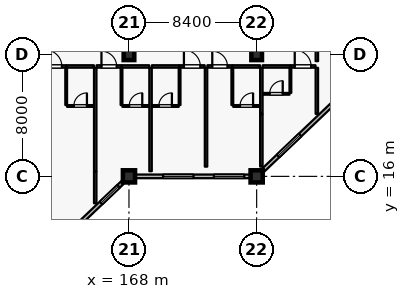
"""IFC4 building model, lengths in metres.
Left out: names, types, materials, properties, quantities, classifications, styles, units other than length and angle.
Written with IfcOpenShell. Run it as: python <this file> out.ifc"""

import sys

from ifc_helpers import new_model, si_unit, direction, frame, frame_2d, origin, origin_2d, place, context, subcontext, project, spatial, rectangle, extrude, element, fill, save


model = new_model("IFC4")
c1 = context("Model", 3, precision=1e-05, world=origin(), true_north=direction((0.0, 1.0)))
c2 = subcontext(c1, "Body", "Model", "MODEL_VIEW")
j1 = project(units=[si_unit("LENGTHUNIT", "METRE"), si_unit("PLANEANGLEUNIT", "RADIAN")], contexts=[c1])
p1 = place(None, origin())
s1 = spatial("IfcSite", under=j1, at=p1, CompositionType="ELEMENT")
p2 = place(p1, origin())
s2 = spatial("IfcBuilding", under=s1, at=p2, CompositionType="ELEMENT")
p3 = place(p2, frame((0.0, 0.0, 11.4)))
s3 = spatial("IfcBuildingStorey", under=s2, at=p3, CompositionType="ELEMENT", Elevation=11.4)
for number, where, z_axis, x_axis in (
    (1, (168.0, 16.0, 0.0), (0.0, 0.0, 1.0), (1.0, 0.0, 0.0)),
    (2, (176.4, 16.0, 0.0), (0.0, 0.0, 1.0), (1.0, 0.0, 0.0)),
):
    element("IfcColumn", number, at=place(p3, frame(where, z_axis=z_axis, x_axis=x_axis)), inside=s3, PredefinedType="COLUMN", context=c2, shape_type="SweptSolid", body=[
        extrude(rectangle(XDim=0.8, YDim=0.8, at=origin_2d()), origin(), (0.0, 0.0, 1.0), 4.8),
    ])
for number, where, z_axis, x_axis in (
    (3, (168.0, 24.0, 0.0), (0.0, 0.0, 1.0), (1.0, 0.0, 0.0)),
    (4, (176.4, 24.0, 0.0), (0.0, 0.0, 1.0), (1.0, 0.0, 0.0)),
):
    element("IfcColumn", number, at=place(p3, frame(where, z_axis=z_axis, x_axis=x_axis)), inside=s3, PredefinedType="COLUMN", context=c2, shape_type="SweptSolid", body=[
        extrude(rectangle(XDim=0.7, YDim=0.7, at=origin_2d()), origin(), (0.0, 0.0, 1.0), 4.8),
    ])
p4 = place(p3, frame((167.6, 15.619, 0.0), z_axis=(0.0, 0.0, 1.0), x_axis=(-0.724156739794, -0.689635422677, 0.0)))
e5 = element("IfcWall", 5, at=p4, inside=s3, PredefinedType="SOLIDWALL", context=c2, shape_type="SweptSolid", body=[
    extrude(rectangle(XDim=10.495, YDim=0.24, at=frame_2d((5.248, 0.0))), origin(), (0.0, 0.0, 1.0), 4.13),
])
p5 = place(p4, frame((0.388, 0.0, 0.8)))
e6 = element("IfcOpeningElement", 6, at=p5, cuts=e5, PredefinedType="OPENING", context=c2, shape_type="SweptSolid", body=[
    extrude(rectangle(XDim=1.6, YDim=1.6, at=frame_2d((0.8, 0.8))), frame((0.0, 0.13, 0.0), z_axis=(0.0, -1.0, 0.0), x_axis=(1.0, 0.0, 0.0)), (0.0, 0.0, 1.0), 0.26),
])
p6 = place(p4, frame((4.234, 0.0, 0.8)))
e7 = element("IfcOpeningElement", 7, at=p6, cuts=e5, PredefinedType="OPENING", context=c2, shape_type="SweptSolid", body=[
    extrude(rectangle(XDim=1.6, YDim=1.6, at=frame_2d((0.8, 0.8))), frame((0.0, 0.13, 0.0), z_axis=(0.0, -1.0, 0.0), x_axis=(1.0, 0.0, 0.0)), (0.0, 0.0, 1.0), 0.26),
])
p7 = place(p4, frame((8.294, 0.0, 0.8)))
e8 = element("IfcOpeningElement", 8, at=p7, cuts=e5, PredefinedType="OPENING", context=c2, shape_type="SweptSolid", body=[
    extrude(rectangle(XDim=1.6, YDim=1.6, at=frame_2d((0.8, 0.8))), frame((0.0, 0.13, 0.0), z_axis=(0.0, -1.0, 0.0), x_axis=(1.0, 0.0, 0.0)), (0.0, 0.0, 1.0), 0.26),
])
p8 = place(p3, frame((176.0, 16.0, 0.0), z_axis=(0.0, 0.0, 1.0), x_axis=(-1.0, 0.0, 0.0)))
e9 = element("IfcWall", 9, at=p8, inside=s3, PredefinedType="SOLIDWALL", context=c2, shape_type="SweptSolid", body=[
    extrude(rectangle(XDim=7.6, YDim=0.24, at=frame_2d((3.8, 0.0))), origin(), (0.0, 0.0, 1.0), 4.13),
])
p9 = place(p8, frame((0.415, 0.0, 0.8)))
e10 = element("IfcOpeningElement", 10, at=p9, cuts=e9, PredefinedType="OPENING", context=c2, shape_type="SweptSolid", body=[
    extrude(rectangle(XDim=2.0, YDim=1.75, at=frame_2d((1.0, 0.875))), frame((0.0, 0.13, 0.0), z_axis=(0.0, -1.0, 0.0), x_axis=(1.0, 0.0, 0.0)), (0.0, 0.0, 1.0), 0.26),
])
p10 = place(p8, frame((3.755, 0.0, 0.8)))
e11 = element("IfcOpeningElement", 11, at=p10, cuts=e9, PredefinedType="OPENING", context=c2, shape_type="SweptSolid", body=[
    extrude(rectangle(XDim=2.0, YDim=1.75, at=frame_2d((1.0, 0.875))), frame((0.0, 0.13, 0.0), z_axis=(0.0, -1.0, 0.0), x_axis=(1.0, 0.0, 0.0)), (0.0, 0.0, 1.0), 0.26),
])
p11 = place(p3, frame((184.4, 23.619, 0.0), z_axis=(0.0, 0.0, 1.0), x_axis=(-0.724145676014, -0.689647040094, 0.0)))
e12 = element("IfcWall", 12, at=p11, inside=s3, PredefinedType="SOLIDWALL", context=c2, shape_type="SweptSolid", body=[
    extrude(rectangle(XDim=10.495, YDim=0.24, at=frame_2d((5.248, 0.0))), origin(), (0.0, 0.0, 1.0), 4.13),
])
p12 = place(p11, frame((2.066, 0.0, 0.8)))
e13 = element("IfcOpeningElement", 13, at=p12, cuts=e12, PredefinedType="OPENING", context=c2, shape_type="SweptSolid", body=[
    extrude(rectangle(XDim=2.0, YDim=1.75, at=frame_2d((1.0, 0.875))), frame((0.0, 0.13, 0.0), z_axis=(0.0, -1.0, 0.0), x_axis=(1.0, 0.0, 0.0)), (0.0, 0.0, 1.0), 0.26),
])
p13 = place(p11, frame((7.099, 0.0, 0.8)))
e14 = element("IfcOpeningElement", 14, at=p13, cuts=e12, PredefinedType="OPENING", context=c2, shape_type="SweptSolid", body=[
    extrude(rectangle(XDim=2.0, YDim=1.75, at=frame_2d((1.0, 0.875))), frame((0.0, 0.13, 0.0), z_axis=(0.0, -1.0, 0.0), x_axis=(1.0, 0.0, 0.0)), (0.0, 0.0, 1.0), 0.26),
])
p14 = place(p3, frame((162.22, 23.23, 0.0), z_axis=(0.0, 0.0, 1.0), x_axis=(1.0, 0.0, 0.0)))
e15 = element("IfcWall", 15, at=p14, inside=s3, PredefinedType="PARTITIONING", context=c2, shape_type="SweptSolid", body=[
    extrude(rectangle(XDim=1.65, YDim=0.16, at=frame_2d((0.825, 0.0))), origin(), (0.0, 0.0, 1.0), 4.535),
])
p15 = place(p14, frame((0.285, 0.0, 0.0)))
e16 = element("IfcOpeningElement", 16, at=p15, cuts=e15, PredefinedType="OPENING", context=c2, shape_type="SweptSolid", body=[
    extrude(rectangle(XDim=1.08, YDim=2.3, at=frame_2d((0.54, 1.15))), frame((0.0, 0.09, 0.0), z_axis=(0.0, -1.0, 0.0), x_axis=(1.0, 0.0, 0.0)), (0.0, 0.0, 1.0), 0.18),
])
p16 = place(p3, frame((163.88, 23.23, 0.0), z_axis=(0.0, 0.0, 1.0), x_axis=(1.0, 0.0, 0.0)))
e17 = element("IfcWall", 17, at=p16, inside=s3, PredefinedType="PARTITIONING", context=c2, shape_type="SweptSolid", body=[
    extrude(rectangle(XDim=1.81, YDim=0.16, at=frame_2d((0.905, 0.0))), origin(), (0.0, 0.0, 1.0), 4.535),
])
p17 = place(p3, frame((163.87, 20.69, 0.0), z_axis=(0.0, 0.0, 1.0), x_axis=(0.0, 1.0, 0.0)))
e18 = element("IfcWall", 18, at=p17, inside=s3, PredefinedType="PARTITIONING", context=c2, shape_type="SweptSolid", body=[
    extrude(rectangle(XDim=2.45, YDim=0.115, at=frame_2d((1.225, 0.0))), origin(), (0.0, 0.0, 1.0), 4.535),
])
p18 = place(p3, frame((163.93, 20.63, 0.0), z_axis=(0.0, 0.0, 1.0), x_axis=(1.0, 0.0, 0.0)))
e19 = element("IfcWall", 19, at=p18, inside=s3, PredefinedType="PARTITIONING", context=c2, shape_type="SweptSolid", body=[
    extrude(rectangle(XDim=1.75, YDim=0.115, at=frame_2d((0.875, 0.0))), origin(), (0.0, 0.0, 1.0), 4.535),
])
p19 = place(p18, frame((0.445, 0.0, 0.0)))
e20 = element("IfcOpeningElement", 20, at=p19, cuts=e19, PredefinedType="OPENING", context=c2, shape_type="SweptSolid", body=[
    extrude(rectangle(XDim=0.86, YDim=2.12, at=frame_2d((0.43, 1.06))), frame((0.0, 0.067, 0.0), z_axis=(0.0, -1.0, 0.0), x_axis=(1.0, 0.0, 0.0)), (0.0, 0.0, 1.0), 0.135),
])
p20 = place(p3, frame((165.78, 14.23, 0.0), z_axis=(0.0, 0.0, 1.0), x_axis=(0.0, 1.0, 0.0)))
e21 = element("IfcWall", 21, at=p20, inside=s3, PredefinedType="PARTITIONING", context=c2, shape_type="SweptSolid", body=[
    extrude(rectangle(XDim=2.1, YDim=0.16, at=frame_2d((1.05, 0.0))), origin(), (0.0, 0.0, 1.0), 4.535),
])
p21 = place(p3, frame((165.87, 23.23, 0.0), z_axis=(0.0, 0.0, 1.0), x_axis=(1.0, 0.0, 0.0)))
e22 = element("IfcWall", 22, at=p21, inside=s3, PredefinedType="PARTITIONING", context=c2, shape_type="SweptSolid", body=[
    extrude(rectangle(XDim=1.64, YDim=0.16, at=frame_2d((0.82, 0.0))), origin(), (0.0, 0.0, 1.0), 4.535),
])
p22 = place(p21, frame((0.32, 0.0, 0.0)))
e23 = element("IfcOpeningElement", 23, at=p22, cuts=e22, PredefinedType="OPENING", context=c2, shape_type="SweptSolid", body=[
    extrude(rectangle(XDim=1.0, YDim=2.25, at=frame_2d((0.5, 1.125))), frame((0.0, 0.09, 0.0), z_axis=(0.0, -1.0, 0.0), x_axis=(1.0, 0.0, 0.0)), (0.0, 0.0, 1.0), 0.18),
])
p23 = place(p3, frame((167.52, 23.23, 0.0), z_axis=(0.0, 0.0, 1.0), x_axis=(1.0, 0.0, 0.0)))
e24 = element("IfcWall", 24, at=p23, inside=s3, PredefinedType="PARTITIONING", context=c2, shape_type="SweptSolid", body=[
    extrude(rectangle(XDim=1.81, YDim=0.16, at=frame_2d((0.905, 0.0))), origin(), (0.0, 0.0, 1.0), 4.535),
])
p24 = place(p3, frame((167.51, 20.69, 0.0), z_axis=(0.0, 0.0, 1.0), x_axis=(0.0, 1.0, 0.0)))
e25 = element("IfcWall", 25, at=p24, inside=s3, PredefinedType="PARTITIONING", context=c2, shape_type="SweptSolid", body=[
    extrude(rectangle(XDim=2.45, YDim=0.115, at=frame_2d((1.225, 0.0))), origin(), (0.0, 0.0, 1.0), 4.535),
])
p25 = place(p3, frame((167.57, 20.63, 0.0), z_axis=(0.0, 0.0, 1.0), x_axis=(1.0, 0.0, 0.0)))
e26 = element("IfcWall", 26, at=p25, inside=s3, PredefinedType="PARTITIONING", context=c2, shape_type="SweptSolid", body=[
    extrude(rectangle(XDim=1.75, YDim=0.115, at=frame_2d((0.875, 0.0))), origin(), (0.0, 0.0, 1.0), 4.535),
])
p26 = place(p25, frame((0.445, 0.0, 0.0)))
e27 = element("IfcOpeningElement", 27, at=p26, cuts=e26, PredefinedType="OPENING", context=c2, shape_type="SweptSolid", body=[
    extrude(rectangle(XDim=0.86, YDim=2.12, at=frame_2d((0.43, 1.06))), frame((0.0, 0.067, 0.0), z_axis=(0.0, -1.0, 0.0), x_axis=(1.0, 0.0, 0.0)), (0.0, 0.0, 1.0), 0.135),
])
p27 = place(p3, frame((165.78, 16.34, 0.0), z_axis=(0.0, 0.0, 1.0), x_axis=(0.0, 1.0, 0.0)))
e28 = element("IfcWall", 28, at=p27, inside=s3, PredefinedType="PARTITIONING", context=c2, shape_type="SweptSolid", body=[
    extrude(rectangle(XDim=6.8, YDim=0.16, at=frame_2d((3.4, 0.0))), origin(), (0.0, 0.0, 1.0), 4.535),
])
p28 = place(p3, frame((169.51, 23.23, 0.0), z_axis=(0.0, 0.0, 1.0), x_axis=(1.0, 0.0, 0.0)))
e29 = element("IfcWall", 29, at=p28, inside=s3, PredefinedType="PARTITIONING", context=c2, shape_type="SweptSolid", body=[
    extrude(rectangle(XDim=1.81, YDim=0.16, at=frame_2d((0.905, 0.0))), origin(), (0.0, 0.0, 1.0), 4.535),
])
p29 = place(p3, frame((171.33, 23.23, 0.0), z_axis=(0.0, 0.0, 1.0), x_axis=(1.0, 0.0, 0.0)))
e30 = element("IfcWall", 30, at=p29, inside=s3, PredefinedType="PARTITIONING", context=c2, shape_type="SweptSolid", body=[
    extrude(rectangle(XDim=1.65, YDim=0.16, at=frame_2d((0.825, 0.0))), origin(), (0.0, 0.0, 1.0), 4.535),
])
p30 = place(p29, frame((0.285, 0.0, 0.0)))
e31 = element("IfcOpeningElement", 31, at=p30, cuts=e30, PredefinedType="OPENING", context=c2, shape_type="SweptSolid", body=[
    extrude(rectangle(XDim=1.08, YDim=2.3, at=frame_2d((0.54, 1.15))), frame((0.0, 0.09, 0.0), z_axis=(0.0, -1.0, 0.0), x_axis=(1.0, 0.0, 0.0)), (0.0, 0.0, 1.0), 0.18),
])
p31 = place(p3, frame((171.33, 20.69, 0.0), z_axis=(0.0, 0.0, 1.0), x_axis=(0.0, 1.0, 0.0)))
e32 = element("IfcWall", 32, at=p31, inside=s3, PredefinedType="PARTITIONING", context=c2, shape_type="SweptSolid", body=[
    extrude(rectangle(XDim=2.45, YDim=0.115, at=frame_2d((1.225, 0.0))), origin(), (0.0, 0.0, 1.0), 4.535),
])
p32 = place(p3, frame((169.52, 20.63, 0.0), z_axis=(0.0, 0.0, 1.0), x_axis=(1.0, 0.0, 0.0)))
e33 = element("IfcWall", 33, at=p32, inside=s3, PredefinedType="PARTITIONING", context=c2, shape_type="SweptSolid", body=[
    extrude(rectangle(XDim=1.75, YDim=0.115, at=frame_2d((0.875, 0.0))), origin(), (0.0, 0.0, 1.0), 4.535),
])
p33 = place(p32, frame((0.445, 0.0, 0.0)))
e34 = element("IfcOpeningElement", 34, at=p33, cuts=e33, PredefinedType="OPENING", context=c2, shape_type="SweptSolid", body=[
    extrude(rectangle(XDim=0.86, YDim=2.12, at=frame_2d((0.43, 1.06))), frame((0.0, 0.067, 0.0), z_axis=(0.0, -1.0, 0.0), x_axis=(1.0, 0.0, 0.0)), (0.0, 0.0, 1.0), 0.135),
])
p34 = place(p3, frame((169.42, 16.34, 0.0), z_axis=(0.0, 0.0, 1.0), x_axis=(0.0, 1.0, 0.0)))
e35 = element("IfcWall", 35, at=p34, inside=s3, PredefinedType="PARTITIONING", context=c2, shape_type="SweptSolid", body=[
    extrude(rectangle(XDim=6.8, YDim=0.16, at=frame_2d((3.4, 0.0))), origin(), (0.0, 0.0, 1.0), 4.535),
])
p35 = place(p3, frame((173.16, 23.23, 0.0), z_axis=(0.0, 0.0, 1.0), x_axis=(1.0, 0.0, 0.0)))
e36 = element("IfcWall", 36, at=p35, inside=s3, PredefinedType="PARTITIONING", context=c2, shape_type="SweptSolid", body=[
    extrude(rectangle(XDim=1.64, YDim=0.16, at=frame_2d((0.82, 0.0))), origin(), (0.0, 0.0, 1.0), 4.535),
])
p36 = place(p35, frame((0.32, 0.0, 0.0)))
e37 = element("IfcOpeningElement", 37, at=p36, cuts=e36, PredefinedType="OPENING", context=c2, shape_type="SweptSolid", body=[
    extrude(rectangle(XDim=1.0, YDim=2.25, at=frame_2d((0.5, 1.125))), frame((0.0, 0.09, 0.0), z_axis=(0.0, -1.0, 0.0), x_axis=(1.0, 0.0, 0.0)), (0.0, 0.0, 1.0), 0.18),
])
p37 = place(p3, frame((174.81, 23.23, 0.0), z_axis=(0.0, 0.0, 1.0), x_axis=(1.0, 0.0, 0.0)))
e38 = element("IfcWall", 38, at=p37, inside=s3, PredefinedType="PARTITIONING", context=c2, shape_type="SweptSolid", body=[
    extrude(rectangle(XDim=1.81, YDim=0.16, at=frame_2d((0.905, 0.0))), origin(), (0.0, 0.0, 1.0), 4.535),
])
p38 = place(p3, frame((174.8, 20.69, 0.0), z_axis=(0.0, 0.0, 1.0), x_axis=(0.0, 1.0, 0.0)))
e39 = element("IfcWall", 39, at=p38, inside=s3, PredefinedType="PARTITIONING", context=c2, shape_type="SweptSolid", body=[
    extrude(rectangle(XDim=2.45, YDim=0.115, at=frame_2d((1.225, 0.0))), origin(), (0.0, 0.0, 1.0), 4.535),
])
p39 = place(p3, frame((174.86, 20.63, 0.0), z_axis=(0.0, 0.0, 1.0), x_axis=(1.0, 0.0, 0.0)))
e40 = element("IfcWall", 40, at=p39, inside=s3, PredefinedType="PARTITIONING", context=c2, shape_type="SweptSolid", body=[
    extrude(rectangle(XDim=1.75, YDim=0.115, at=frame_2d((0.875, 0.0))), origin(), (0.0, 0.0, 1.0), 4.535),
])
p40 = place(p39, frame((0.445, 0.0, 0.0)))
e41 = element("IfcOpeningElement", 41, at=p40, cuts=e40, PredefinedType="OPENING", context=c2, shape_type="SweptSolid", body=[
    extrude(rectangle(XDim=0.86, YDim=2.12, at=frame_2d((0.43, 1.06))), frame((0.0, 0.067, 0.0), z_axis=(0.0, -1.0, 0.0), x_axis=(1.0, 0.0, 0.0)), (0.0, 0.0, 1.0), 0.135),
])
p41 = place(p3, frame((173.07, 16.64, 0.0), z_axis=(0.0, 0.0, 1.0), x_axis=(0.0, 1.0, 0.0)))
e42 = element("IfcWall", 42, at=p41, inside=s3, PredefinedType="PARTITIONING", context=c2, shape_type="SweptSolid", body=[
    extrude(rectangle(XDim=6.5, YDim=0.16, at=frame_2d((3.25, 0.0))), origin(), (0.0, 0.0, 1.0), 4.535),
])
p42 = place(p3, frame((176.71, 16.64, 0.0), z_axis=(0.0, 0.0, 1.0), x_axis=(0.0, 1.0, 0.0)))
e43 = element("IfcWall", 43, at=p42, inside=s3, PredefinedType="PARTITIONING", context=c2, shape_type="SweptSolid", body=[
    extrude(rectangle(XDim=3.46, YDim=0.16, at=frame_2d((1.73, 0.0))), origin(), (0.0, 0.0, 1.0), 4.535),
])
p43 = place(p3, frame((176.8, 23.23, 0.0), z_axis=(0.0, 0.0, 1.0), x_axis=(1.0, 0.0, 0.0)))
e44 = element("IfcWall", 44, at=p43, inside=s3, PredefinedType="PARTITIONING", context=c2, shape_type="SweptSolid", body=[
    extrude(rectangle(XDim=1.81, YDim=0.16, at=frame_2d((0.905, 0.0))), origin(), (0.0, 0.0, 1.0), 4.535),
])
p44 = place(p3, frame((178.62, 23.23, 0.0), z_axis=(0.0, 0.0, 1.0), x_axis=(1.0, 0.0, 0.0)))
e45 = element("IfcWall", 45, at=p44, inside=s3, PredefinedType="PARTITIONING", context=c2, shape_type="SweptSolid", body=[
    extrude(rectangle(XDim=1.65, YDim=0.16, at=frame_2d((0.825, 0.0))), origin(), (0.0, 0.0, 1.0), 4.535),
])
p45 = place(p44, frame((0.285, 0.0, 0.0)))
e46 = element("IfcOpeningElement", 46, at=p45, cuts=e45, PredefinedType="OPENING", context=c2, shape_type="SweptSolid", body=[
    extrude(rectangle(XDim=1.08, YDim=2.3, at=frame_2d((0.54, 1.15))), frame((0.0, 0.09, 0.0), z_axis=(0.0, -1.0, 0.0), x_axis=(1.0, 0.0, 0.0)), (0.0, 0.0, 1.0), 0.18),
])
p46 = place(p3, frame((178.62, 21.49, 0.0), z_axis=(0.0, 0.0, 1.0), x_axis=(0.0, 1.0, 0.0)))
e47 = element("IfcWall", 47, at=p46, inside=s3, PredefinedType="PARTITIONING", context=c2, shape_type="SweptSolid", body=[
    extrude(rectangle(XDim=1.65, YDim=0.115, at=frame_2d((0.825, 0.0))), origin(), (0.0, 0.0, 1.0), 4.535),
])
p47 = place(p3, frame((176.81, 21.43, 0.0), z_axis=(0.0, 0.0, 1.0), x_axis=(1.0, 0.0, 0.0)))
e48 = element("IfcWall", 48, at=p47, inside=s3, PredefinedType="PARTITIONING", context=c2, shape_type="SweptSolid", body=[
    extrude(rectangle(XDim=1.75, YDim=0.115, at=frame_2d((0.875, 0.0))), origin(), (0.0, 0.0, 1.0), 4.535),
])
p48 = place(p47, frame((0.445, 0.0, 0.0)))
e49 = element("IfcOpeningElement", 49, at=p48, cuts=e48, PredefinedType="OPENING", context=c2, shape_type="SweptSolid", body=[
    extrude(rectangle(XDim=0.86, YDim=2.12, at=frame_2d((0.43, 1.06))), frame((0.0, 0.067, 0.0), z_axis=(0.0, -1.0, 0.0), x_axis=(1.0, 0.0, 0.0)), (0.0, 0.0, 1.0), 0.135),
])
for number, where, z_axis, x_axis in (
    (50, (176.71, 20.11, 0.0), (0.0, 0.0, 1.0), (0.0, 1.0, 0.0)),
    (51, (180.36, 20.11, 0.0), (0.0, 0.0, 1.0), (0.0, 1.0, 0.0)),
):
    element("IfcWall", number, at=place(p3, frame(where, z_axis=z_axis, x_axis=x_axis)), inside=s3, PredefinedType="PARTITIONING", context=c2, shape_type="SweptSolid", body=[
        extrude(rectangle(XDim=3.03, YDim=0.16, at=frame_2d((1.515, 0.0))), origin(), (0.0, 0.0, 1.0), 4.535),
    ])
p49 = place(p3, frame((180.36, 23.58, 0.0), z_axis=(0.0, 0.0, 1.0), x_axis=(0.0, 1.0, 0.0)))
e52 = element("IfcWall", 52, at=p49, inside=s3, PredefinedType="PARTITIONING", context=c2, shape_type="SweptSolid", body=[
    extrude(rectangle(XDim=7.56, YDim=0.16, at=frame_2d((3.78, 0.0))), origin(), (0.0, 0.0, 1.0), 4.535),
])
p50 = place(p5, origin())
e53 = element("IfcWindow", 53, at=p50, inside=s3, PartitioningType="SINGLE_PANEL", PredefinedType="WINDOW", context=c2, shape_type="SweptSolid", body=[
    extrude(rectangle(XDim=1.6, YDim=1.6, at=frame_2d((0.8, 0.8))), frame((0.0, 0.03, 0.0), z_axis=(0.0, -1.0, 0.0), x_axis=(1.0, 0.0, 0.0)), (0.0, 0.0, 1.0), 0.06),
])
fill(e6, e53)
p51 = place(p9, origin())
e54 = element("IfcWindow", 54, at=p51, inside=s3, PartitioningType="DOUBLE_PANEL_VERTICAL", PredefinedType="WINDOW", context=c2, shape_type="SweptSolid", body=[
    extrude(rectangle(XDim=2.0, YDim=1.75, at=frame_2d((1.0, 0.875))), frame((0.0, 0.03, 0.0), z_axis=(0.0, -1.0, 0.0), x_axis=(1.0, 0.0, 0.0)), (0.0, 0.0, 1.0), 0.06),
])
fill(e10, e54)
p52 = place(p10, origin())
e55 = element("IfcWindow", 55, at=p52, inside=s3, PartitioningType="DOUBLE_PANEL_VERTICAL", PredefinedType="WINDOW", context=c2, shape_type="SweptSolid", body=[
    extrude(rectangle(XDim=2.0, YDim=1.75, at=frame_2d((1.0, 0.875))), frame((0.0, 0.03, 0.0), z_axis=(0.0, -1.0, 0.0), x_axis=(1.0, 0.0, 0.0)), (0.0, 0.0, 1.0), 0.06),
])
fill(e11, e55)
p53 = place(p13, origin())
e56 = element("IfcWindow", 56, at=p53, inside=s3, PartitioningType="DOUBLE_PANEL_VERTICAL", PredefinedType="WINDOW", context=c2, shape_type="SweptSolid", body=[
    extrude(rectangle(XDim=2.0, YDim=1.75, at=frame_2d((1.0, 0.875))), frame((0.0, 0.03, 0.0), z_axis=(0.0, -1.0, 0.0), x_axis=(1.0, 0.0, 0.0)), (0.0, 0.0, 1.0), 0.06),
])
fill(e14, e56)
p54 = place(p15, origin())
e57 = element("IfcDoor", 57, at=p54, inside=s3, OperationType="SINGLE_SWING_LEFT", PredefinedType="DOOR", context=c2, shape_type="SweptSolid", body=[
    extrude(rectangle(XDim=1.08, YDim=2.3, at=frame_2d((0.54, 1.15))), frame((0.0, 0.025, 0.0), z_axis=(0.0, -1.0, 0.0), x_axis=(1.0, 0.0, 0.0)), (0.0, 0.0, 1.0), 0.05),
])
fill(e16, e57)
p55 = place(p19, origin())
e58 = element("IfcDoor", 58, at=p55, inside=s3, OperationType="SINGLE_SWING_RIGHT", PredefinedType="DOOR", context=c2, shape_type="SweptSolid", body=[
    extrude(rectangle(XDim=0.86, YDim=2.12, at=frame_2d((0.43, 1.06))), frame((0.0, 0.025, 0.0), z_axis=(0.0, -1.0, 0.0), x_axis=(1.0, 0.0, 0.0)), (0.0, 0.0, 1.0), 0.05),
])
fill(e20, e58)
p56 = place(p22, origin())
e59 = element("IfcDoor", 59, at=p56, inside=s3, OperationType="SINGLE_SWING_LEFT", PredefinedType="DOOR", context=c2, shape_type="SweptSolid", body=[
    extrude(rectangle(XDim=1.0, YDim=2.25, at=frame_2d((0.5, 1.125))), frame((0.0, 0.025, 0.0), z_axis=(0.0, -1.0, 0.0), x_axis=(1.0, 0.0, 0.0)), (0.0, 0.0, 1.0), 0.05),
])
fill(e23, e59)
p57 = place(p26, origin())
e60 = element("IfcDoor", 60, at=p57, inside=s3, OperationType="SINGLE_SWING_RIGHT", PredefinedType="DOOR", context=c2, shape_type="SweptSolid", body=[
    extrude(rectangle(XDim=0.86, YDim=2.12, at=frame_2d((0.43, 1.06))), frame((0.0, 0.025, 0.0), z_axis=(0.0, -1.0, 0.0), x_axis=(1.0, 0.0, 0.0)), (0.0, 0.0, 1.0), 0.05),
])
fill(e27, e60)
p58 = place(p30, origin())
e61 = element("IfcDoor", 61, at=p58, inside=s3, OperationType="SINGLE_SWING_LEFT", PredefinedType="DOOR", context=c2, shape_type="SweptSolid", body=[
    extrude(rectangle(XDim=1.08, YDim=2.3, at=frame_2d((0.54, 1.15))), frame((0.0, 0.025, 0.0), z_axis=(0.0, -1.0, 0.0), x_axis=(1.0, 0.0, 0.0)), (0.0, 0.0, 1.0), 0.05),
])
fill(e31, e61)
p59 = place(p33, origin())
e62 = element("IfcDoor", 62, at=p59, inside=s3, OperationType="SINGLE_SWING_RIGHT", PredefinedType="DOOR", context=c2, shape_type="SweptSolid", body=[
    extrude(rectangle(XDim=0.86, YDim=2.12, at=frame_2d((0.43, 1.06))), frame((0.0, 0.025, 0.0), z_axis=(0.0, -1.0, 0.0), x_axis=(1.0, 0.0, 0.0)), (0.0, 0.0, 1.0), 0.05),
])
fill(e34, e62)
p60 = place(p36, origin())
e63 = element("IfcDoor", 63, at=p60, inside=s3, OperationType="SINGLE_SWING_LEFT", PredefinedType="DOOR", context=c2, shape_type="SweptSolid", body=[
    extrude(rectangle(XDim=1.0, YDim=2.25, at=frame_2d((0.5, 1.125))), frame((0.0, 0.025, 0.0), z_axis=(0.0, -1.0, 0.0), x_axis=(1.0, 0.0, 0.0)), (0.0, 0.0, 1.0), 0.05),
])
fill(e37, e63)
p61 = place(p40, origin())
e64 = element("IfcDoor", 64, at=p61, inside=s3, OperationType="SINGLE_SWING_RIGHT", PredefinedType="DOOR", context=c2, shape_type="SweptSolid", body=[
    extrude(rectangle(XDim=0.86, YDim=2.12, at=frame_2d((0.43, 1.06))), frame((0.0, 0.025, 0.0), z_axis=(0.0, -1.0, 0.0), x_axis=(1.0, 0.0, 0.0)), (0.0, 0.0, 1.0), 0.05),
])
fill(e41, e64)
p62 = place(p45, origin())
e65 = element("IfcDoor", 65, at=p62, inside=s3, OperationType="SINGLE_SWING_LEFT", PredefinedType="DOOR", context=c2, shape_type="SweptSolid", body=[
    extrude(rectangle(XDim=1.08, YDim=2.3, at=frame_2d((0.54, 1.15))), frame((0.0, 0.025, 0.0), z_axis=(0.0, -1.0, 0.0), x_axis=(1.0, 0.0, 0.0)), (0.0, 0.0, 1.0), 0.05),
])
fill(e46, e65)
p63 = place(p48, origin())
e66 = element("IfcDoor", 66, at=p63, inside=s3, OperationType="SINGLE_SWING_RIGHT", PredefinedType="DOOR", context=c2, shape_type="SweptSolid", body=[
    extrude(rectangle(XDim=0.86, YDim=2.12, at=frame_2d((0.43, 1.06))), frame((0.0, 0.025, 0.0), z_axis=(0.0, -1.0, 0.0), x_axis=(1.0, 0.0, 0.0)), (0.0, 0.0, 1.0), 0.05),
])
fill(e49, e66)
save(model, sys.argv[1])
